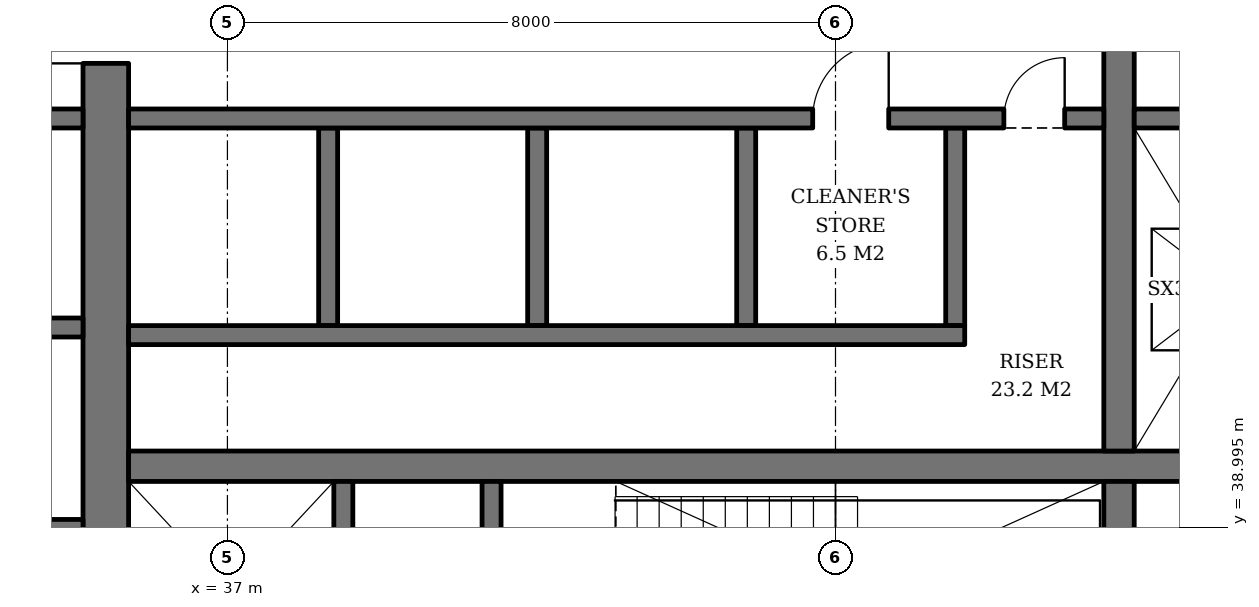
"""IFC4 building model, lengths in metres.
Left out: names, types, materials, properties, quantities, classifications, styles, units other than length and angle.
Written with IfcOpenShell. Run it as: python <this file> out.ifc"""

import sys

from ifc_helpers import new_model, si_unit, direction, frame, frame_2d, origin, place, context, subcontext, project, spatial, rectangle, extrude, element, fill, save


model = new_model("IFC4")
c1 = context("Model", 3, precision=1e-05, world=origin(), true_north=direction((0.0, 1.0)))
c2 = subcontext(c1, "Body", "Model", "MODEL_VIEW")
j1 = project(units=[si_unit("LENGTHUNIT", "METRE"), si_unit("PLANEANGLEUNIT", "RADIAN")], contexts=[c1])
p1 = place(None, origin())
s1 = spatial("IfcSite", under=j1, at=p1, CompositionType="ELEMENT")
p2 = place(p1, origin())
s2 = spatial("IfcBuilding", under=s1, at=p2, CompositionType="ELEMENT")
p3 = place(p2, frame((0.0, 0.0, 161.6)))
s3 = spatial("IfcBuildingStorey", under=s2, at=p3, CompositionType="ELEMENT", Elevation=161.6)
p4 = place(p3, frame((35.4, 36.7, 0.0), z_axis=(0.0, 0.0, 1.0), x_axis=(0.0, 1.0, 0.0)))
e1 = element("IfcWall", 1, at=p4, inside=s3, PredefinedType="SHEAR", context=c2, shape_type="SweptSolid", body=[
    extrude(rectangle(XDim=18.6, YDim=0.6, at=frame_2d((9.3, 0.0))), origin(), (0.0, 0.0, 1.0), 3.8),
])
p5 = place(p4, frame((8.4, 0.0, 0.0)))
e2 = element("IfcOpeningElement", 2, at=p5, cuts=e1, PredefinedType="OPENING", context=c2, shape_type="SweptSolid", body=[
    extrude(rectangle(XDim=1.8, YDim=2.4, at=frame_2d((0.9, 1.2))), frame((0.0, 0.31, 0.0), z_axis=(0.0, -1.0, 0.0), x_axis=(1.0, 0.0, 0.0)), (0.0, 0.0, 1.0), 0.62),
])
p6 = place(p3, frame((35.7, 39.8, 0.0), z_axis=(0.0, 0.0, 1.0), x_axis=(1.0, 0.0, 0.0)))
e3 = element("IfcWall", 3, at=p6, inside=s3, PredefinedType="SHEAR", context=c2, shape_type="SweptSolid", body=[
    extrude(rectangle(XDim=18.6, YDim=0.4, at=frame_2d((9.3, 0.0))), origin(), (0.0, 0.0, 1.0), 3.8),
])
p7 = place(p3, frame((48.73, 36.7, 0.0), z_axis=(0.0, 0.0, 1.0), x_axis=(0.0, 1.0, 0.0)))
e4 = element("IfcWall", 4, at=p7, inside=s3, PredefinedType="SHEAR", context=c2, shape_type="SweptSolid", body=[
    extrude(rectangle(XDim=2.9, YDim=0.4, at=frame_2d((1.45, 0.0))), origin(), (0.0, 0.0, 1.0), 3.8),
])
p8 = place(p3, frame((48.73, 40.0, 0.0), z_axis=(0.0, 0.0, 1.0), x_axis=(0.0, 1.0, 0.0)))
e5 = element("IfcWall", 5, at=p8, inside=s3, PredefinedType="SHEAR", context=c2, shape_type="SweptSolid", body=[
    extrude(rectangle(XDim=12.0, YDim=0.4, at=frame_2d((6.0, 0.0))), origin(), (0.0, 0.0, 1.0), 3.8),
])
p9 = place(p8, frame((5.5, 0.0, 0.0)))
e6 = element("IfcOpeningElement", 6, at=p9, cuts=e5, PredefinedType="OPENING", context=c2, shape_type="SweptSolid", body=[
    extrude(rectangle(XDim=1.0, YDim=2.1, at=frame_2d((0.5, 1.05))), frame((0.0, 0.21, 0.0), z_axis=(0.0, -1.0, 0.0), x_axis=(1.0, 0.0, 0.0)), (0.0, 0.0, 1.0), 0.42),
])
p10 = place(p3, frame((38.525, 36.7, 0.0), z_axis=(0.0, 0.0, 1.0), x_axis=(0.0, 1.0, 0.0)))
e7 = element("IfcWall", 7, at=p10, inside=s3, PredefinedType="SHEAR", context=c2, shape_type="SweptSolid", body=[
    extrude(rectangle(XDim=2.9, YDim=0.25, at=frame_2d((1.45, 0.0))), origin(), (0.0, 0.0, 1.0), 3.8),
])
p11 = place(p10, frame((0.8, 0.0, 0.0)))
e8 = element("IfcOpeningElement", 8, at=p11, cuts=e7, PredefinedType="OPENING", context=c2, shape_type="SweptSolid", body=[
    extrude(rectangle(XDim=1.3, YDim=2.2, at=frame_2d((0.65, 1.1))), frame((0.0, 0.135, 0.0), z_axis=(0.0, -1.0, 0.0), x_axis=(1.0, 0.0, 0.0)), (0.0, 0.0, 1.0), 0.27),
])
p12 = place(p3, frame((40.475, 36.7, 0.0), z_axis=(0.0, 0.0, 1.0), x_axis=(0.0, 1.0, 0.0)))
e9 = element("IfcWall", 9, at=p12, inside=s3, PredefinedType="SHEAR", context=c2, shape_type="SweptSolid", body=[
    extrude(rectangle(XDim=2.9, YDim=0.25, at=frame_2d((1.45, 0.0))), origin(), (0.0, 0.0, 1.0), 3.8),
])
p13 = place(p12, frame((0.75, 0.0, 0.0)))
e10 = element("IfcOpeningElement", 10, at=p13, cuts=e9, PredefinedType="OPENING", context=c2, shape_type="SweptSolid", body=[
    extrude(rectangle(XDim=1.2, YDim=2.1, at=frame_2d((0.6, 1.05))), frame((0.0, 0.135, 0.0), z_axis=(0.0, -1.0, 0.0), x_axis=(1.0, 0.0, 0.0)), (0.0, 0.0, 1.0), 0.27),
])
for number, where, z_axis, x_axis in (
    (11, (38.325, 44.25, 0.0), (0.0, 0.0, 1.0), (0.0, -1.0, 0.0)),
    (12, (41.075, 44.25, 0.0), (0.0, 0.0, 1.0), (0.0, -1.0, 0.0)),
    (13, (43.825, 44.25, 0.0), (0.0, 0.0, 1.0), (0.0, -1.0, 0.0)),
    (14, (46.575, 44.25, 0.0), (0.0, 0.0, 1.0), (0.0, -1.0, 0.0)),
):
    element("IfcWall", number, at=place(p3, frame(where, z_axis=z_axis, x_axis=x_axis)), inside=s3, PredefinedType="SHEAR", context=c2, shape_type="SweptSolid", body=[
        extrude(rectangle(XDim=2.6, YDim=0.25, at=frame_2d((1.3, 0.0))), origin(), (0.0, 0.0, 1.0), 3.8),
    ])
p14 = place(p3, frame((35.7, 41.525, 0.0), z_axis=(0.0, 0.0, 1.0), x_axis=(1.0, 0.0, 0.0)))
e15 = element("IfcWall", 15, at=p14, inside=s3, PredefinedType="SHEAR", context=c2, shape_type="SweptSolid", body=[
    extrude(rectangle(XDim=11.0, YDim=0.25, at=frame_2d((5.5, 0.0))), origin(), (0.0, 0.0, 1.0), 3.8),
])
p15 = place(p3, frame((35.7, 44.375, 0.0), z_axis=(0.0, 0.0, 1.0), x_axis=(1.0, 0.0, 0.0)))
e16 = element("IfcWall", 16, at=p15, inside=s3, PredefinedType="SHEAR", context=c2, shape_type="SweptSolid", body=[
    extrude(rectangle(XDim=12.83, YDim=0.25, at=frame_2d((6.415, 0.0))), origin(), (0.0, 0.0, 1.0), 3.8),
])
p16 = place(p15, frame((9.0, 0.0, 0.0)))
e17 = element("IfcOpeningElement", 17, at=p16, cuts=e16, PredefinedType="OPENING", context=c2, shape_type="SweptSolid", body=[
    extrude(rectangle(XDim=1.0, YDim=2.1, at=frame_2d((0.5, 1.05))), frame((0.0, 0.135, 0.0), z_axis=(0.0, -1.0, 0.0), x_axis=(1.0, 0.0, 0.0)), (0.0, 0.0, 1.0), 0.27),
])
p17 = place(p15, frame((11.515, 0.0, 0.0)))
e18 = element("IfcOpeningElement", 18, at=p17, cuts=e16, PredefinedType="OPENING", context=c2, shape_type="SweptSolid", body=[
    extrude(rectangle(XDim=0.8, YDim=2.0, at=frame_2d((0.4, 1.0))), frame((0.0, 0.135, 0.0), z_axis=(0.0, -1.0, 0.0), x_axis=(1.0, 0.0, 0.0)), (0.0, 0.0, 1.0), 0.27),
])
p18 = place(p3, frame((48.93, 44.375, 0.0), z_axis=(0.0, 0.0, 1.0), x_axis=(1.0, 0.0, 0.0)))
e19 = element("IfcWall", 19, at=p18, inside=s3, PredefinedType="SHEAR", context=c2, shape_type="SweptSolid", body=[
    extrude(rectangle(XDim=5.37, YDim=0.25, at=frame_2d((2.685, 0.0))), origin(), (0.0, 0.0, 1.0), 3.8),
])
p19 = place(p3, frame((32.4, 38.875, 0.0), z_axis=(0.0, 0.0, 1.0), x_axis=(1.0, 0.0, 0.0)))
e20 = element("IfcWall", 20, at=p19, inside=s3, PredefinedType="SHEAR", context=c2, shape_type="SweptSolid", body=[
    extrude(rectangle(XDim=2.7, YDim=0.45, at=frame_2d((1.35, 0.0))), origin(), (0.0, 0.0, 1.0), 3.8),
])
for number, where, z_axis, x_axis in (
    (21, (32.4, 41.625, 0.0), (0.0, 0.0, 1.0), (1.0, 0.0, 0.0)),
    (22, (32.4, 44.375, 0.0), (0.0, 0.0, 1.0), (1.0, 0.0, 0.0)),
):
    element("IfcWall", number, at=place(p3, frame(where, z_axis=z_axis, x_axis=x_axis)), inside=s3, PredefinedType="SHEAR", context=c2, shape_type="SweptSolid", body=[
        extrude(rectangle(XDim=2.7, YDim=0.25, at=frame_2d((1.35, 0.0))), origin(), (0.0, 0.0, 1.0), 3.8),
    ])
p20 = place(p16, origin())
e23 = element("IfcDoor", 23, at=p20, inside=s3, OperationType="SINGLE_SWING_RIGHT", PredefinedType="DOOR", context=c2, shape_type="SweptSolid", body=[
    extrude(rectangle(XDim=1.0, YDim=2.1, at=frame_2d((0.5, 1.05))), frame((0.0, 0.025, 0.0), z_axis=(0.0, -1.0, 0.0), x_axis=(1.0, 0.0, 0.0)), (0.0, 0.0, 1.0), 0.05),
])
fill(e17, e23)
p21 = place(p17, origin())
e24 = element("IfcDoor", 24, at=p21, inside=s3, OperationType="SINGLE_SWING_RIGHT", PredefinedType="DOOR", context=c2, shape_type="SweptSolid", body=[
    extrude(rectangle(XDim=0.8, YDim=2.0, at=frame_2d((0.4, 1.0))), frame((0.0, 0.025, 0.0), z_axis=(0.0, -1.0, 0.0), x_axis=(1.0, 0.0, 0.0)), (0.0, 0.0, 1.0), 0.05),
])
fill(e18, e24)
p22 = place(p5, origin())
e25 = element("IfcDoor", 25, at=p22, inside=s3, OperationType="DOUBLE_DOOR_SINGLE_SWING", PredefinedType="DOOR", context=c2, shape_type="SweptSolid", body=[
    extrude(rectangle(XDim=1.8, YDim=2.4, at=frame_2d((0.9, 1.2))), frame((0.0, 0.025, 0.0), z_axis=(0.0, -1.0, 0.0), x_axis=(1.0, 0.0, 0.0)), (0.0, 0.0, 1.0), 0.05),
])
fill(e2, e25)
save(model, sys.argv[1])
